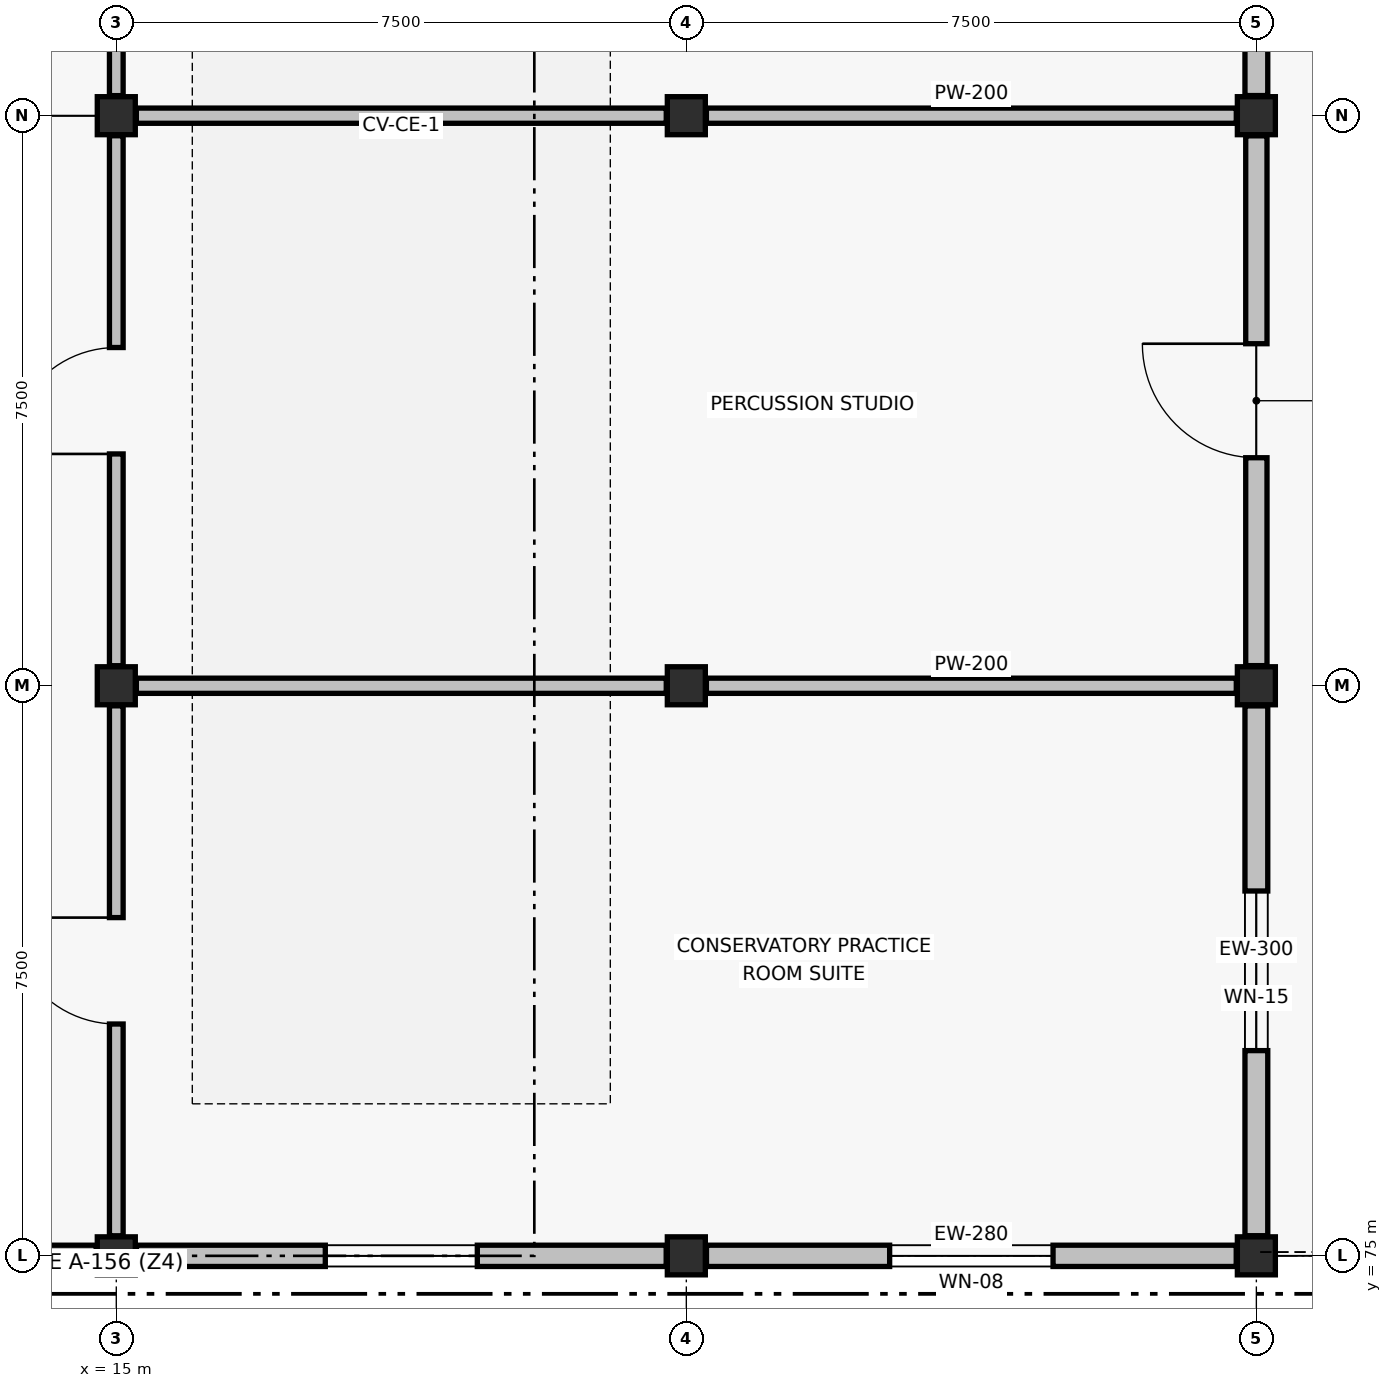
"""IFC4 building model, lengths in metres.
Left out: names, types, materials, properties, quantities, classifications, styles, units other than length and angle.
Written with IfcOpenShell. Run it as: python <this file> out.ifc"""

import sys

from ifc_helpers import new_model, si_unit, direction, frame, frame_2d, origin, origin_2d, place, context, subcontext, project, spatial, rectangle, extrude, element, fill, save


model = new_model("IFC4")
c1 = context("Model", 3, precision=1e-05, world=origin(), true_north=direction((0.0, 1.0)))
c2 = subcontext(c1, "Body", "Model", "MODEL_VIEW")
j1 = project(units=[si_unit("LENGTHUNIT", "METRE"), si_unit("PLANEANGLEUNIT", "RADIAN")], contexts=[c1])
p1 = place(None, origin())
s1 = spatial("IfcSite", under=j1, at=p1, CompositionType="ELEMENT")
p2 = place(p1, origin())
s2 = spatial("IfcBuilding", under=s1, at=p2, CompositionType="ELEMENT")
p3 = place(p2, frame((0.0, 0.0, 17.1)))
s3 = spatial("IfcBuildingStorey", under=s2, at=p3, CompositionType="ELEMENT", Elevation=17.1)
for number, where, z_axis, x_axis in (
    (1, (15.0, 75.0, 0.0), (0.0, 0.0, 1.0), (1.0, 0.0, 0.0)),
    (2, (15.0, 82.5, 0.0), (0.0, 0.0, 1.0), (1.0, 0.0, 0.0)),
    (3, (15.0, 90.0, 0.0), (0.0, 0.0, 1.0), (1.0, 0.0, 0.0)),
    (4, (22.5, 75.0, 0.0), (0.0, 0.0, 1.0), (1.0, 0.0, 0.0)),
    (5, (22.5, 82.5, 0.0), (0.0, 0.0, 1.0), (1.0, 0.0, 0.0)),
    (6, (22.5, 90.0, 0.0), (0.0, 0.0, 1.0), (1.0, 0.0, 0.0)),
    (7, (30.0, 75.0, 0.0), (0.0, 0.0, 1.0), (1.0, 0.0, 0.0)),
    (8, (30.0, 82.5, 0.0), (0.0, 0.0, 1.0), (1.0, 0.0, 0.0)),
    (9, (30.0, 90.0, 0.0), (0.0, 0.0, 1.0), (1.0, 0.0, 0.0)),
):
    element("IfcColumn", number, at=place(p3, frame(where, z_axis=z_axis, x_axis=x_axis)), inside=s3, PredefinedType="COLUMN", context=c2, shape_type="SweptSolid", body=[
        extrude(rectangle(XDim=0.5, YDim=0.5, at=origin_2d()), origin(), (0.0, 0.0, 1.0), 3.9),
    ])
p4 = place(p3, frame((8.12, 75.0, 0.0), z_axis=(0.0, 0.0, 1.0), x_axis=(1.0, 0.0, 0.0)))
e10 = element("IfcWall", 10, at=p4, inside=s3, PredefinedType="SOLIDWALL", context=c2, shape_type="SweptSolid", body=[
    extrude(rectangle(XDim=6.615, YDim=0.28, at=frame_2d((3.308, 0.0))), origin(), (0.0, 0.0, 1.0), 2.59),
])
p5 = place(p4, frame((2.205, 0.0, 0.6)))
e11 = element("IfcOpeningElement", 11, at=p5, cuts=e10, PredefinedType="OPENING", context=c2, shape_type="SweptSolid", body=[
    extrude(rectangle(XDim=1.85, YDim=1.8, at=frame_2d((0.925, 0.9))), frame((0.0, 0.15, 0.0), z_axis=(0.0, -1.0, 0.0), x_axis=(1.0, 0.0, 0.0)), (0.0, 0.0, 1.0), 0.3),
])
p6 = place(p3, frame((15.265, 75.0, 0.0), z_axis=(0.0, 0.0, 1.0), x_axis=(1.0, 0.0, 0.0)))
e12 = element("IfcWall", 12, at=p6, inside=s3, PredefinedType="SOLIDWALL", context=c2, shape_type="SweptSolid", body=[
    extrude(rectangle(XDim=6.97, YDim=0.28, at=frame_2d((3.485, 0.0))), origin(), (0.0, 0.0, 1.0), 2.59),
])
p7 = place(p6, frame((2.485, 0.0, 0.6)))
e13 = element("IfcOpeningElement", 13, at=p7, cuts=e12, PredefinedType="OPENING", context=c2, shape_type="SweptSolid", body=[
    extrude(rectangle(XDim=2.0, YDim=1.45, at=frame_2d((1.0, 0.725))), frame((0.0, 0.15, 0.0), z_axis=(0.0, -1.0, 0.0), x_axis=(1.0, 0.0, 0.0)), (0.0, 0.0, 1.0), 0.3),
])
p8 = place(p3, frame((22.765, 75.0, 0.0), z_axis=(0.0, 0.0, 1.0), x_axis=(1.0, 0.0, 0.0)))
e14 = element("IfcWall", 14, at=p8, inside=s3, PredefinedType="SOLIDWALL", context=c2, shape_type="SweptSolid", body=[
    extrude(rectangle(XDim=6.97, YDim=0.28, at=frame_2d((3.485, 0.0))), origin(), (0.0, 0.0, 1.0), 2.84),
])
p9 = place(p8, frame((2.41, 0.0, 0.6)))
e15 = element("IfcOpeningElement", 15, at=p9, cuts=e14, PredefinedType="OPENING", context=c2, shape_type="SweptSolid", body=[
    extrude(rectangle(XDim=2.15, YDim=1.45, at=frame_2d((1.075, 0.725))), frame((0.0, 0.15, 0.0), z_axis=(0.0, -1.0, 0.0), x_axis=(1.0, 0.0, 0.0)), (0.0, 0.0, 1.0), 0.3),
])
p10 = place(p3, frame((30.0, 75.265, 0.0), z_axis=(0.0, 0.0, 1.0), x_axis=(0.0, 1.0, 0.0)))
e16 = element("IfcWall", 16, at=p10, inside=s3, PredefinedType="SOLIDWALL", context=c2, shape_type="SweptSolid", body=[
    extrude(rectangle(XDim=6.97, YDim=0.3, at=frame_2d((3.485, 0.0))), origin(), (0.0, 0.0, 1.0), 2.74),
])
p11 = place(p10, frame((2.435, 0.0, 0.6)))
e17 = element("IfcOpeningElement", 17, at=p11, cuts=e16, PredefinedType="OPENING", context=c2, shape_type="SweptSolid", body=[
    extrude(rectangle(XDim=2.1, YDim=1.3, at=frame_2d((1.05, 0.65))), frame((0.0, 0.16, 0.0), z_axis=(0.0, -1.0, 0.0), x_axis=(1.0, 0.0, 0.0)), (0.0, 0.0, 1.0), 0.32),
])
p12 = place(p3, frame((30.0, 82.765, 0.0), z_axis=(0.0, 0.0, 1.0), x_axis=(0.0, 1.0, 0.0)))
e18 = element("IfcWall", 18, at=p12, inside=s3, PredefinedType="SOLIDWALL", context=c2, shape_type="SweptSolid", body=[
    extrude(rectangle(XDim=6.97, YDim=0.28, at=frame_2d((3.485, 0.0))), origin(), (0.0, 0.0, 1.0), 2.69),
])
p13 = place(p12, frame((2.735, 0.0, 0.0)))
e19 = element("IfcOpeningElement", 19, at=p13, cuts=e18, PredefinedType="OPENING", context=c2, shape_type="SweptSolid", body=[
    extrude(rectangle(XDim=1.5, YDim=2.15, at=frame_2d((0.75, 1.075))), frame((0.0, 0.15, 0.0), z_axis=(0.0, -1.0, 0.0), x_axis=(1.0, 0.0, 0.0)), (0.0, 0.0, 1.0), 0.3),
])
p14 = place(p3, frame((30.0, 90.265, 0.0), z_axis=(0.0, 0.0, 1.0), x_axis=(0.0, 1.0, 0.0)))
e20 = element("IfcWall", 20, at=p14, inside=s3, PredefinedType="SOLIDWALL", context=c2, shape_type="SweptSolid", body=[
    extrude(rectangle(XDim=6.97, YDim=0.3, at=frame_2d((3.485, 0.0))), origin(), (0.0, 0.0, 1.0), 2.64),
])
p15 = place(p14, frame((2.885, 0.0, 0.6)))
e21 = element("IfcOpeningElement", 21, at=p15, cuts=e20, PredefinedType="OPENING", context=c2, shape_type="SweptSolid", body=[
    extrude(rectangle(XDim=1.2, YDim=1.2, at=frame_2d((0.6, 0.6))), frame((0.0, 0.16, 0.0), z_axis=(0.0, -1.0, 0.0), x_axis=(1.0, 0.0, 0.0)), (0.0, 0.0, 1.0), 0.32),
])
for number, where, z_axis, x_axis in (
    (22, (15.264, 82.5, 0.0), (0.0, 0.0, 1.0), (1.0, 0.0, 0.0)),
    (23, (22.764, 82.5, 0.0), (0.0, 0.0, 1.0), (1.0, 0.0, 0.0)),
):
    element("IfcWall", number, at=place(p3, frame(where, z_axis=z_axis, x_axis=x_axis)), inside=s3, PredefinedType="PARTITIONING", context=c2, shape_type="SweptSolid", body=[
        extrude(rectangle(XDim=6.972, YDim=0.2, at=frame_2d((3.486, 0.0))), origin(), (0.0, 0.0, 1.0), 2.54),
    ])
p16 = place(p3, frame((15.264, 90.0, 0.0), z_axis=(0.0, 0.0, 1.0), x_axis=(1.0, 0.0, 0.0)))
e24 = element("IfcWall", 24, at=p16, inside=s3, PredefinedType="PARTITIONING", context=c2, shape_type="SweptSolid", body=[
    extrude(rectangle(XDim=6.972, YDim=0.2, at=frame_2d((3.486, 0.0))), origin(), (0.0, 0.0, 1.0), 2.59),
])
p17 = place(p3, frame((22.764, 90.0, 0.0), z_axis=(0.0, 0.0, 1.0), x_axis=(1.0, 0.0, 0.0)))
e25 = element("IfcWall", 25, at=p17, inside=s3, PredefinedType="PARTITIONING", context=c2, shape_type="SweptSolid", body=[
    extrude(rectangle(XDim=6.972, YDim=0.2, at=frame_2d((3.486, 0.0))), origin(), (0.0, 0.0, 1.0), 2.69),
])
p18 = place(p3, frame((15.0, 75.264, 0.0), z_axis=(0.0, 0.0, 1.0), x_axis=(0.0, 1.0, 0.0)))
e26 = element("IfcWall", 26, at=p18, inside=s3, PredefinedType="PARTITIONING", context=c2, shape_type="SweptSolid", body=[
    extrude(rectangle(XDim=6.972, YDim=0.18, at=frame_2d((3.486, 0.0))), origin(), (0.0, 0.0, 1.0), 2.54),
])
p19 = place(p18, frame((2.786, 0.0, 0.0)))
e27 = element("IfcOpeningElement", 27, at=p19, cuts=e26, PredefinedType="OPENING", context=c2, shape_type="SweptSolid", body=[
    extrude(rectangle(XDim=1.4, YDim=2.14, at=frame_2d((0.7, 1.07))), frame((0.0, 0.1, 0.0), z_axis=(0.0, -1.0, 0.0), x_axis=(1.0, 0.0, 0.0)), (0.0, 0.0, 1.0), 0.2),
])
p20 = place(p3, frame((15.0, 82.764, 0.0), z_axis=(0.0, 0.0, 1.0), x_axis=(0.0, 1.0, 0.0)))
e28 = element("IfcWall", 28, at=p20, inside=s3, PredefinedType="PARTITIONING", context=c2, shape_type="SweptSolid", body=[
    extrude(rectangle(XDim=6.972, YDim=0.18, at=frame_2d((3.486, 0.0))), origin(), (0.0, 0.0, 1.0), 2.54),
])
p21 = place(p20, frame((2.786, 0.0, 0.0)))
e29 = element("IfcOpeningElement", 29, at=p21, cuts=e28, PredefinedType="OPENING", context=c2, shape_type="SweptSolid", body=[
    extrude(rectangle(XDim=1.4, YDim=2.14, at=frame_2d((0.7, 1.07))), frame((0.0, 0.1, 0.0), z_axis=(0.0, -1.0, 0.0), x_axis=(1.0, 0.0, 0.0)), (0.0, 0.0, 1.0), 0.2),
])
p22 = place(p3, frame((15.0, 90.264, 0.0), z_axis=(0.0, 0.0, 1.0), x_axis=(0.0, 1.0, 0.0)))
e30 = element("IfcWall", 30, at=p22, inside=s3, PredefinedType="PARTITIONING", context=c2, shape_type="SweptSolid", body=[
    extrude(rectangle(XDim=6.972, YDim=0.18, at=frame_2d((3.486, 0.0))), origin(), (0.0, 0.0, 1.0), 2.59),
])
p23 = place(p22, frame((2.786, 0.0, 0.0)))
e31 = element("IfcOpeningElement", 31, at=p23, cuts=e30, PredefinedType="OPENING", context=c2, shape_type="SweptSolid", body=[
    extrude(rectangle(XDim=1.4, YDim=2.14, at=frame_2d((0.7, 1.07))), frame((0.0, 0.1, 0.0), z_axis=(0.0, -1.0, 0.0), x_axis=(1.0, 0.0, 0.0)), (0.0, 0.0, 1.0), 0.2),
])
p24 = place(p7, origin())
e32 = element("IfcWindow", 32, at=p24, inside=s3, PartitioningType="SINGLE_PANEL", PredefinedType="WINDOW", context=c2, shape_type="SweptSolid", body=[
    extrude(rectangle(XDim=2.0, YDim=1.45, at=frame_2d((1.0, 0.725))), frame((0.0, 0.03, 0.0), z_axis=(0.0, -1.0, 0.0), x_axis=(1.0, 0.0, 0.0)), (0.0, 0.0, 1.0), 0.06),
])
fill(e13, e32)
p25 = place(p9, origin())
e33 = element("IfcWindow", 33, at=p25, inside=s3, PartitioningType="SINGLE_PANEL", PredefinedType="WINDOW", context=c2, shape_type="SweptSolid", body=[
    extrude(rectangle(XDim=2.15, YDim=1.45, at=frame_2d((1.075, 0.725))), frame((0.0, 0.03, 0.0), z_axis=(0.0, -1.0, 0.0), x_axis=(1.0, 0.0, 0.0)), (0.0, 0.0, 1.0), 0.06),
])
fill(e15, e33)
p26 = place(p11, origin())
e34 = element("IfcWindow", 34, at=p26, inside=s3, PartitioningType="SINGLE_PANEL", PredefinedType="WINDOW", context=c2, shape_type="SweptSolid", body=[
    extrude(rectangle(XDim=2.1, YDim=1.3, at=frame_2d((1.05, 0.65))), frame((0.0, 0.03, 0.0), z_axis=(0.0, -1.0, 0.0), x_axis=(1.0, 0.0, 0.0)), (0.0, 0.0, 1.0), 0.06),
])
fill(e17, e34)
p27 = place(p13, frame((1.5, 0.0, 0.0), z_axis=(0.0, 0.0, 1.0), x_axis=(-1.0, 0.0, 0.0)))
e35 = element("IfcDoor", 35, at=p27, inside=s3, OperationType="SINGLE_SWING_LEFT", PredefinedType="DOOR", context=c2, shape_type="SweptSolid", body=[
    extrude(rectangle(XDim=1.5, YDim=2.15, at=frame_2d((0.75, 1.075))), frame((0.0, 0.025, 0.0), z_axis=(0.0, -1.0, 0.0), x_axis=(1.0, 0.0, 0.0)), (0.0, 0.0, 1.0), 0.05),
])
fill(e19, e35)
p28 = place(p19, origin())
e36 = element("IfcDoor", 36, at=p28, inside=s3, OperationType="SINGLE_SWING_RIGHT", PredefinedType="DOOR", context=c2, shape_type="SweptSolid", body=[
    extrude(rectangle(XDim=1.4, YDim=2.14, at=frame_2d((0.7, 1.07))), frame((0.0, 0.025, 0.0), z_axis=(0.0, -1.0, 0.0), x_axis=(1.0, 0.0, 0.0)), (0.0, 0.0, 1.0), 0.05),
])
fill(e27, e36)
p29 = place(p21, origin())
e37 = element("IfcDoor", 37, at=p29, inside=s3, OperationType="SINGLE_SWING_LEFT", PredefinedType="DOOR", context=c2, shape_type="SweptSolid", body=[
    extrude(rectangle(XDim=1.4, YDim=2.14, at=frame_2d((0.7, 1.07))), frame((0.0, 0.025, 0.0), z_axis=(0.0, -1.0, 0.0), x_axis=(1.0, 0.0, 0.0)), (0.0, 0.0, 1.0), 0.05),
])
fill(e29, e37)
save(model, sys.argv[1])
